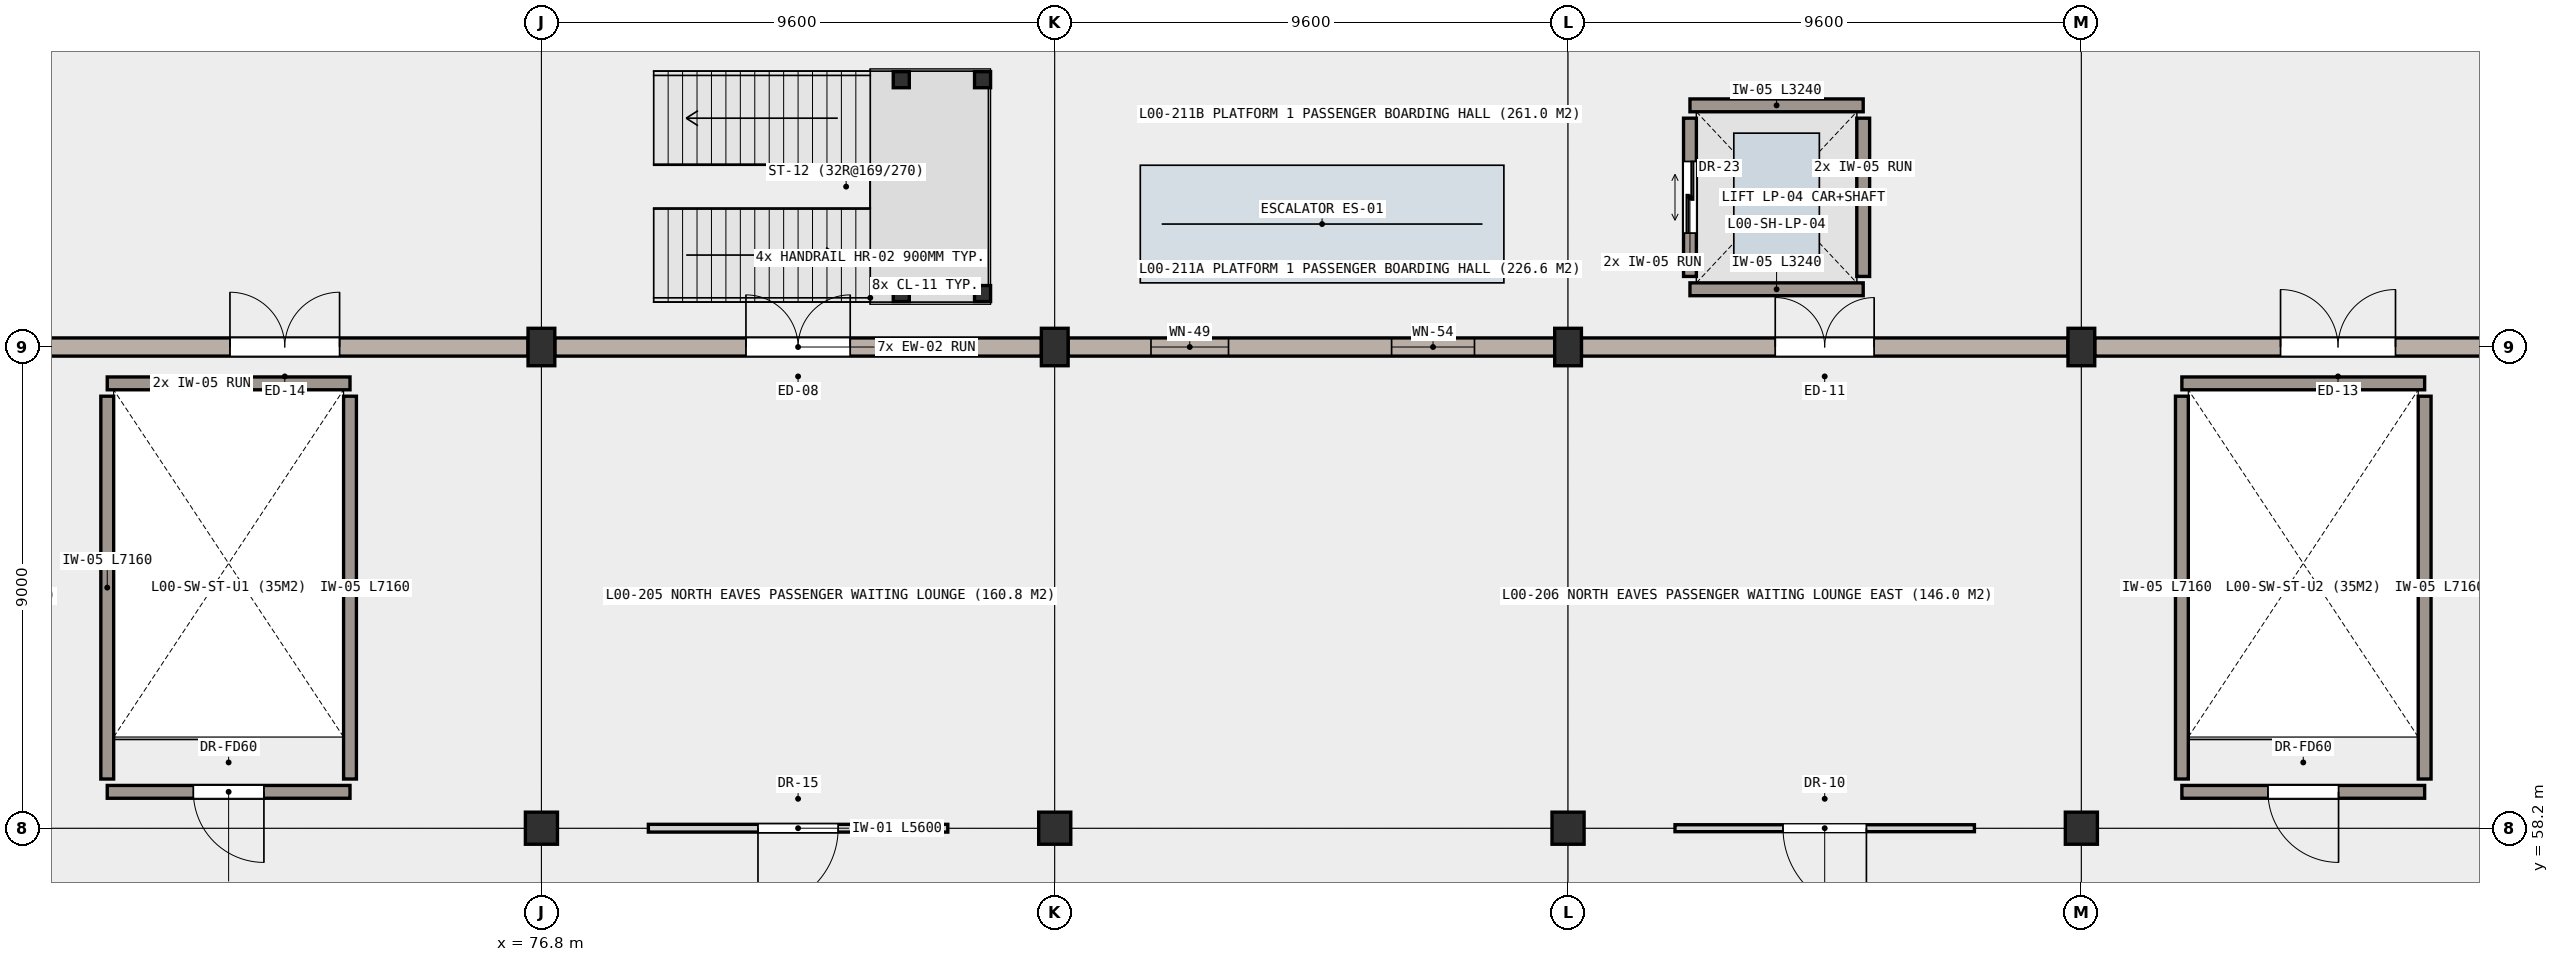
"""IFC4 building model, lengths in metres.
Left out: names, types, materials, properties, quantities, classifications, styles, units other than length and angle.
Written with IfcOpenShell. Run it as: python <this file> out.ifc"""

import sys

from ifc_helpers import new_model, si_unit, direction, frame, frame_2d, origin, origin_2d, place, context, subcontext, project, spatial, rectangle, hollow_rectangle, i_section, extrude, element, fill, save


model = new_model("IFC4")
c1 = context("Model", 3, precision=1e-05, world=origin(), true_north=direction((0.0, 1.0)))
c2 = subcontext(c1, "Body", "Model", "MODEL_VIEW")
j1 = project(units=[si_unit("LENGTHUNIT", "METRE"), si_unit("PLANEANGLEUNIT", "RADIAN")], contexts=[c1])
p1 = place(None, origin())
s1 = spatial("IfcSite", under=j1, at=p1, CompositionType="ELEMENT")
p2 = place(p1, origin())
s2 = spatial("IfcBuilding", under=s1, at=p2, CompositionType="ELEMENT")
p3 = place(p2, origin())
s3 = spatial("IfcBuildingStorey", under=s2, at=p3, CompositionType="ELEMENT", Elevation=0.0)
p4 = place(p3, frame((76.8, 58.2, 0.0), z_axis=(0.0, 0.0, 1.0), x_axis=(1.0, 0.0, 0.0)))
e1 = element("IfcColumn", 1, at=p4, inside=s3, PredefinedType="COLUMN", context=c2, shape_type="SweptSolid", body=[
    extrude(hollow_rectangle(XDim=0.6, YDim=0.6, WallThickness=0.03, at=origin_2d()), origin(), (0.0, 0.0, 1.0), 5.4),
])
p5 = place(p3, frame((76.8, 67.2, 0.0), z_axis=(0.0, 0.0, 1.0), x_axis=(1.0, 0.0, 0.0)))
e2 = element("IfcColumn", 2, at=p5, inside=s3, PredefinedType="COLUMN", context=c2, shape_type="SweptSolid", body=[
    extrude(hollow_rectangle(XDim=0.5, YDim=0.7, WallThickness=0.032, at=origin_2d()), origin(), (0.0, 0.0, 1.0), 5.4),
])
p6 = place(p3, frame((86.4, 58.2, 0.0), z_axis=(0.0, 0.0, 1.0), x_axis=(1.0, 0.0, 0.0)))
e3 = element("IfcColumn", 3, at=p6, inside=s3, PredefinedType="COLUMN", context=c2, shape_type="SweptSolid", body=[
    extrude(hollow_rectangle(XDim=0.6, YDim=0.6, WallThickness=0.03, at=origin_2d()), origin(), (0.0, 0.0, 1.0), 5.4),
])
p7 = place(p3, frame((86.4, 67.2, 0.0), z_axis=(0.0, 0.0, 1.0), x_axis=(1.0, 0.0, 0.0)))
e4 = element("IfcColumn", 4, at=p7, inside=s3, PredefinedType="COLUMN", context=c2, shape_type="SweptSolid", body=[
    extrude(hollow_rectangle(XDim=0.5, YDim=0.7, WallThickness=0.032, at=origin_2d()), origin(), (0.0, 0.0, 1.0), 5.4),
])
p8 = place(p3, frame((96.0, 58.2, 0.0), z_axis=(0.0, 0.0, 1.0), x_axis=(1.0, 0.0, 0.0)))
e5 = element("IfcColumn", 5, at=p8, inside=s3, PredefinedType="COLUMN", context=c2, shape_type="SweptSolid", body=[
    extrude(hollow_rectangle(XDim=0.6, YDim=0.6, WallThickness=0.03, at=origin_2d()), origin(), (0.0, 0.0, 1.0), 5.4),
])
p9 = place(p3, frame((96.0, 67.2, 0.0), z_axis=(0.0, 0.0, 1.0), x_axis=(1.0, 0.0, 0.0)))
e6 = element("IfcColumn", 6, at=p9, inside=s3, PredefinedType="COLUMN", context=c2, shape_type="SweptSolid", body=[
    extrude(hollow_rectangle(XDim=0.5, YDim=0.7, WallThickness=0.032, at=origin_2d()), origin(), (0.0, 0.0, 1.0), 5.4),
])
p10 = place(p3, frame((105.6, 58.2, 0.0), z_axis=(0.0, 0.0, 1.0), x_axis=(1.0, 0.0, 0.0)))
e7 = element("IfcColumn", 7, at=p10, inside=s3, PredefinedType="COLUMN", context=c2, shape_type="SweptSolid", body=[
    extrude(hollow_rectangle(XDim=0.6, YDim=0.6, WallThickness=0.03, at=origin_2d()), origin(), (0.0, 0.0, 1.0), 5.4),
])
p11 = place(p3, frame((105.6, 67.2, 0.0), z_axis=(0.0, 0.0, 1.0), x_axis=(1.0, 0.0, 0.0)))
e8 = element("IfcColumn", 8, at=p11, inside=s3, PredefinedType="COLUMN", context=c2, shape_type="SweptSolid", body=[
    extrude(hollow_rectangle(XDim=0.5, YDim=0.7, WallThickness=0.032, at=origin_2d()), origin(), (0.0, 0.0, 1.0), 5.4),
])
for number, where, z_axis, x_axis in (
    (9, (83.53, 68.2, 0.0), (0.0, 0.0, 1.0), (1.0, 0.0, 0.0)),
    (10, (83.53, 72.2, 0.0), (0.0, 0.0, 1.0), (1.0, 0.0, 0.0)),
    (11, (85.05, 68.2, 0.0), (0.0, 0.0, 1.0), (1.0, 0.0, 0.0)),
    (12, (85.05, 72.2, 0.0), (0.0, 0.0, 1.0), (1.0, 0.0, 0.0)),
):
    element("IfcColumn", number, at=place(p3, frame(where, z_axis=z_axis, x_axis=x_axis)), inside=s3, PredefinedType="COLUMN", context=c2, shape_type="SweptSolid", body=[
        extrude(i_section(OverallWidth=0.3, OverallDepth=0.3, WebThickness=0.011, FlangeThickness=0.019, FilletRadius=0.027, at=origin_2d()), origin(), (0.0, 0.0, 1.0), 2.515),
    ])
p12 = place(p3, frame((67.45, 67.2, 0.0), z_axis=(0.0, 0.0, 1.0), x_axis=(1.0, 0.0, 0.0)))
e13 = element("IfcWall", 13, at=p12, inside=s3, PredefinedType="SOLIDWALL", context=c2, shape_type="SweptSolid", body=[
    extrude(rectangle(XDim=9.1, YDim=0.34, at=frame_2d((4.55, 0.0))), origin(), (0.0, 0.0, 1.0), 4.49),
])
p13 = place(p12, frame((3.525, 0.0, 0.0)))
e14 = element("IfcOpeningElement", 14, at=p13, cuts=e13, PredefinedType="OPENING", context=c2, shape_type="SweptSolid", body=[
    extrude(rectangle(XDim=2.05, YDim=2.45, at=frame_2d((1.025, 1.225))), frame((0.0, 0.18, 0.0), z_axis=(0.0, -1.0, 0.0), x_axis=(1.0, 0.0, 0.0)), (0.0, 0.0, 1.0), 0.36),
])
p14 = place(p3, frame((77.05, 67.2, 0.0), z_axis=(0.0, 0.0, 1.0), x_axis=(1.0, 0.0, 0.0)))
e15 = element("IfcWall", 15, at=p14, inside=s3, PredefinedType="SOLIDWALL", context=c2, shape_type="SweptSolid", body=[
    extrude(rectangle(XDim=9.1, YDim=0.34, at=frame_2d((4.55, 0.0))), origin(), (0.0, 0.0, 1.0), 4.49),
])
p15 = place(p14, frame((3.575, 0.0, 0.0)))
e16 = element("IfcOpeningElement", 16, at=p15, cuts=e15, PredefinedType="OPENING", context=c2, shape_type="SweptSolid", body=[
    extrude(rectangle(XDim=1.95, YDim=2.4, at=frame_2d((0.975, 1.2))), frame((0.0, 0.18, 0.0), z_axis=(0.0, -1.0, 0.0), x_axis=(1.0, 0.0, 0.0)), (0.0, 0.0, 1.0), 0.36),
])
p16 = place(p3, frame((86.65, 67.2, 0.0), z_axis=(0.0, 0.0, 1.0), x_axis=(1.0, 0.0, 0.0)))
e17 = element("IfcWall", 17, at=p16, inside=s3, PredefinedType="SOLIDWALL", context=c2, shape_type="SweptSolid", body=[
    extrude(rectangle(XDim=9.1, YDim=0.34, at=frame_2d((4.55, 0.0))), origin(), (0.0, 0.0, 1.0), 4.49),
])
p17 = place(p16, frame((1.55, 0.0, 0.85)))
e18 = element("IfcOpeningElement", 18, at=p17, cuts=e17, PredefinedType="OPENING", context=c2, shape_type="SweptSolid", body=[
    extrude(rectangle(XDim=1.45, YDim=2.15, at=frame_2d((0.725, 1.075))), frame((0.0, 0.18, 0.0), z_axis=(0.0, -1.0, 0.0), x_axis=(1.0, 0.0, 0.0)), (0.0, 0.0, 1.0), 0.36),
])
p18 = place(p16, frame((6.05, 0.0, 0.85)))
e19 = element("IfcOpeningElement", 19, at=p18, cuts=e17, PredefinedType="OPENING", context=c2, shape_type="SweptSolid", body=[
    extrude(rectangle(XDim=1.55, YDim=1.5, at=frame_2d((0.775, 0.75))), frame((0.0, 0.18, 0.0), z_axis=(0.0, -1.0, 0.0), x_axis=(1.0, 0.0, 0.0)), (0.0, 0.0, 1.0), 0.36),
])
p19 = place(p3, frame((96.25, 67.2, 0.0), z_axis=(0.0, 0.0, 1.0), x_axis=(1.0, 0.0, 0.0)))
e20 = element("IfcWall", 20, at=p19, inside=s3, PredefinedType="SOLIDWALL", context=c2, shape_type="SweptSolid", body=[
    extrude(rectangle(XDim=9.1, YDim=0.34, at=frame_2d((4.55, 0.0))), origin(), (0.0, 0.0, 1.0), 4.49),
])
p20 = place(p19, frame((3.625, 0.0, 0.0)))
e21 = element("IfcOpeningElement", 21, at=p20, cuts=e20, PredefinedType="OPENING", context=c2, shape_type="SweptSolid", body=[
    extrude(rectangle(XDim=1.85, YDim=2.35, at=frame_2d((0.925, 1.175))), frame((0.0, 0.18, 0.0), z_axis=(0.0, -1.0, 0.0), x_axis=(1.0, 0.0, 0.0)), (0.0, 0.0, 1.0), 0.36),
])
p21 = place(p3, frame((105.85, 67.2, 0.0), z_axis=(0.0, 0.0, 1.0), x_axis=(1.0, 0.0, 0.0)))
e22 = element("IfcWall", 22, at=p21, inside=s3, PredefinedType="SOLIDWALL", context=c2, shape_type="SweptSolid", body=[
    extrude(rectangle(XDim=9.1, YDim=0.34, at=frame_2d((4.55, 0.0))), origin(), (0.0, 0.0, 1.0), 4.49),
])
p22 = place(p21, frame((3.475, 0.0, 0.0)))
e23 = element("IfcOpeningElement", 23, at=p22, cuts=e22, PredefinedType="OPENING", context=c2, shape_type="SweptSolid", body=[
    extrude(rectangle(XDim=2.15, YDim=2.5, at=frame_2d((1.075, 1.25))), frame((0.0, 0.18, 0.0), z_axis=(0.0, -1.0, 0.0), x_axis=(1.0, 0.0, 0.0)), (0.0, 0.0, 1.0), 0.36),
])
for number, where, z_axis, x_axis in (
    (24, (101.52, 68.28, 0.0), (0.0, 0.0, 1.0), (-1.0, 0.0, 0.0)),
    (25, (98.28, 71.72, 0.0), (0.0, 0.0, 1.0), (1.0, 0.0, 0.0)),
):
    element("IfcWall", number, at=place(p3, frame(where, z_axis=z_axis, x_axis=x_axis)), inside=s3, PredefinedType="SHEAR", context=c2, shape_type="SweptSolid", body=[
        extrude(rectangle(XDim=3.24, YDim=0.24, at=frame_2d((1.62, 0.0))), origin(), (0.0, 0.0, 1.0), 5.12),
    ])
p23 = place(p3, frame((98.28, 68.52, 0.0), z_axis=(0.0, 0.0, 1.0), x_axis=(0.0, 1.0, 0.0)))
e26 = element("IfcWall", 26, at=p23, inside=s3, PredefinedType="SHEAR", context=c2, shape_type="SweptSolid", body=[
    extrude(rectangle(XDim=2.96, YDim=0.24, at=frame_2d((1.48, 0.0))), origin(), (0.0, 0.0, 1.0), 5.12),
])
p24 = place(p23, frame((0.81, 0.0, 0.0)))
e27 = element("IfcOpeningElement", 27, at=p24, cuts=e26, PredefinedType="OPENING", context=c2, shape_type="SweptSolid", body=[
    extrude(rectangle(XDim=1.34, YDim=2.18, at=frame_2d((0.67, 1.09))), frame((0.0, 0.13, 0.0), z_axis=(0.0, -1.0, 0.0), x_axis=(1.0, 0.0, 0.0)), (0.0, 0.0, 1.0), 0.26),
])
p25 = place(p3, frame((101.52, 71.48, 0.0), z_axis=(0.0, 0.0, 1.0), x_axis=(0.0, -1.0, 0.0)))
e28 = element("IfcWall", 28, at=p25, inside=s3, PredefinedType="SHEAR", context=c2, shape_type="SweptSolid", body=[
    extrude(rectangle(XDim=2.96, YDim=0.24, at=frame_2d((1.48, 0.0))), origin(), (0.0, 0.0, 1.0), 5.12),
])
p26 = place(p3, frame((73.22, 58.88, 0.0), z_axis=(0.0, 0.0, 1.0), x_axis=(-1.0, 0.0, 0.0)))
e29 = element("IfcWall", 29, at=p26, inside=s3, PredefinedType="SHEAR", context=c2, shape_type="SweptSolid", body=[
    extrude(rectangle(XDim=4.54, YDim=0.24, at=frame_2d((2.27, 0.0))), origin(), (0.0, 0.0, 1.0), 5.12),
])
p27 = place(p26, frame((1.61, 0.0, 0.0)))
e30 = element("IfcOpeningElement", 30, at=p27, cuts=e29, PredefinedType="OPENING", context=c2, shape_type="SweptSolid", body=[
    extrude(rectangle(XDim=1.32, YDim=2.15, at=frame_2d((0.66, 1.075))), frame((0.0, 0.13, 0.0), z_axis=(0.0, -1.0, 0.0), x_axis=(1.0, 0.0, 0.0)), (0.0, 0.0, 1.0), 0.26),
])
p28 = place(p3, frame((68.68, 66.52, 0.0), z_axis=(0.0, 0.0, 1.0), x_axis=(1.0, 0.0, 0.0)))
e31 = element("IfcWall", 31, at=p28, inside=s3, PredefinedType="SHEAR", context=c2, shape_type="SweptSolid", body=[
    extrude(rectangle(XDim=4.54, YDim=0.24, at=frame_2d((2.27, 0.0))), origin(), (0.0, 0.0, 1.0), 5.12),
])
for number, where, z_axis, x_axis in (
    (32, (68.68, 59.12, 0.0), (0.0, 0.0, 1.0), (0.0, 1.0, 0.0)),
    (33, (73.22, 66.28, 0.0), (0.0, 0.0, 1.0), (0.0, -1.0, 0.0)),
):
    element("IfcWall", number, at=place(p3, frame(where, z_axis=z_axis, x_axis=x_axis)), inside=s3, PredefinedType="SHEAR", context=c2, shape_type="SweptSolid", body=[
        extrude(rectangle(XDim=7.16, YDim=0.24, at=frame_2d((3.58, 0.0))), origin(), (0.0, 0.0, 1.0), 5.12),
    ])
p29 = place(p3, frame((112.02, 58.88, 0.0), z_axis=(0.0, 0.0, 1.0), x_axis=(-1.0, 0.0, 0.0)))
e34 = element("IfcWall", 34, at=p29, inside=s3, PredefinedType="SHEAR", context=c2, shape_type="SweptSolid", body=[
    extrude(rectangle(XDim=4.54, YDim=0.24, at=frame_2d((2.27, 0.0))), origin(), (0.0, 0.0, 1.0), 5.12),
])
p30 = place(p29, frame((1.61, 0.0, 0.0)))
e35 = element("IfcOpeningElement", 35, at=p30, cuts=e34, PredefinedType="OPENING", context=c2, shape_type="SweptSolid", body=[
    extrude(rectangle(XDim=1.32, YDim=2.15, at=frame_2d((0.66, 1.075))), frame((0.0, 0.13, 0.0), z_axis=(0.0, -1.0, 0.0), x_axis=(1.0, 0.0, 0.0)), (0.0, 0.0, 1.0), 0.26),
])
p31 = place(p3, frame((107.48, 66.52, 0.0), z_axis=(0.0, 0.0, 1.0), x_axis=(1.0, 0.0, 0.0)))
e36 = element("IfcWall", 36, at=p31, inside=s3, PredefinedType="SHEAR", context=c2, shape_type="SweptSolid", body=[
    extrude(rectangle(XDim=4.54, YDim=0.24, at=frame_2d((2.27, 0.0))), origin(), (0.0, 0.0, 1.0), 5.12),
])
for number, where, z_axis, x_axis in (
    (37, (107.48, 59.12, 0.0), (0.0, 0.0, 1.0), (0.0, 1.0, 0.0)),
    (38, (112.02, 66.28, 0.0), (0.0, 0.0, 1.0), (0.0, -1.0, 0.0)),
):
    element("IfcWall", number, at=place(p3, frame(where, z_axis=z_axis, x_axis=x_axis)), inside=s3, PredefinedType="SHEAR", context=c2, shape_type="SweptSolid", body=[
        extrude(rectangle(XDim=7.16, YDim=0.24, at=frame_2d((3.58, 0.0))), origin(), (0.0, 0.0, 1.0), 5.12),
    ])
p32 = place(p3, frame((84.4, 58.2, 0.0), z_axis=(0.0, 0.0, 1.0), x_axis=(-1.0, 0.0, 0.0)))
e39 = element("IfcWall", 39, at=p32, inside=s3, PredefinedType="PARTITIONING", context=c2, shape_type="SweptSolid", body=[
    extrude(rectangle(XDim=5.6, YDim=0.145, at=frame_2d((2.8, 0.0))), origin(), (0.0, 0.0, 1.0), 4.49),
])
p33 = place(p32, frame((2.05, 0.0, 0.0)))
e40 = element("IfcOpeningElement", 40, at=p33, cuts=e39, PredefinedType="OPENING", context=c2, shape_type="SweptSolid", body=[
    extrude(rectangle(XDim=1.5, YDim=2.2, at=frame_2d((0.75, 1.1))), frame((0.0, 0.083, 0.0), z_axis=(0.0, -1.0, 0.0), x_axis=(1.0, 0.0, 0.0)), (0.0, 0.0, 1.0), 0.165),
])
p34 = place(p3, frame((103.6, 58.2, 0.0), z_axis=(0.0, 0.0, 1.0), x_axis=(-1.0, 0.0, 0.0)))
e41 = element("IfcWall", 41, at=p34, inside=s3, PredefinedType="PARTITIONING", context=c2, shape_type="SweptSolid", body=[
    extrude(rectangle(XDim=5.6, YDim=0.13, at=frame_2d((2.8, 0.0))), origin(), (0.0, 0.0, 1.0), 4.49),
])
p35 = place(p34, frame((2.02, 0.0, 0.0)))
e42 = element("IfcOpeningElement", 42, at=p35, cuts=e41, PredefinedType="OPENING", context=c2, shape_type="SweptSolid", body=[
    extrude(rectangle(XDim=1.56, YDim=2.2, at=frame_2d((0.78, 1.1))), frame((0.0, 0.075, 0.0), z_axis=(0.0, -1.0, 0.0), x_axis=(1.0, 0.0, 0.0)), (0.0, 0.0, 1.0), 0.15),
])
p36 = place(p13, origin())
e43 = element("IfcDoor", 43, at=p36, inside=s3, OperationType="DOUBLE_DOOR_SINGLE_SWING", PredefinedType="DOOR", context=c2, shape_type="SweptSolid", body=[
    extrude(rectangle(XDim=2.05, YDim=2.45, at=frame_2d((1.025, 1.225))), frame((0.0, 0.025, 0.0), z_axis=(0.0, -1.0, 0.0), x_axis=(1.0, 0.0, 0.0)), (0.0, 0.0, 1.0), 0.05),
])
fill(e14, e43)
p37 = place(p15, origin())
e44 = element("IfcDoor", 44, at=p37, inside=s3, OperationType="DOUBLE_DOOR_SINGLE_SWING", PredefinedType="DOOR", context=c2, shape_type="SweptSolid", body=[
    extrude(rectangle(XDim=1.95, YDim=2.4, at=frame_2d((0.975, 1.2))), frame((0.0, 0.025, 0.0), z_axis=(0.0, -1.0, 0.0), x_axis=(1.0, 0.0, 0.0)), (0.0, 0.0, 1.0), 0.05),
])
fill(e16, e44)
p38 = place(p17, origin())
e45 = element("IfcWindow", 45, at=p38, inside=s3, PartitioningType="SINGLE_PANEL", PredefinedType="WINDOW", context=c2, shape_type="SweptSolid", body=[
    extrude(rectangle(XDim=1.45, YDim=2.15, at=frame_2d((0.725, 1.075))), frame((0.0, 0.03, 0.0), z_axis=(0.0, -1.0, 0.0), x_axis=(1.0, 0.0, 0.0)), (0.0, 0.0, 1.0), 0.06),
])
fill(e18, e45)
p39 = place(p18, origin())
e46 = element("IfcWindow", 46, at=p39, inside=s3, PartitioningType="SINGLE_PANEL", PredefinedType="WINDOW", context=c2, shape_type="SweptSolid", body=[
    extrude(rectangle(XDim=1.55, YDim=1.5, at=frame_2d((0.775, 0.75))), frame((0.0, 0.03, 0.0), z_axis=(0.0, -1.0, 0.0), x_axis=(1.0, 0.0, 0.0)), (0.0, 0.0, 1.0), 0.06),
])
fill(e19, e46)
p40 = place(p20, origin())
e47 = element("IfcDoor", 47, at=p40, inside=s3, OperationType="DOUBLE_DOOR_SINGLE_SWING", PredefinedType="DOOR", context=c2, shape_type="SweptSolid", body=[
    extrude(rectangle(XDim=1.85, YDim=2.35, at=frame_2d((0.925, 1.175))), frame((0.0, 0.025, 0.0), z_axis=(0.0, -1.0, 0.0), x_axis=(1.0, 0.0, 0.0)), (0.0, 0.0, 1.0), 0.05),
])
fill(e21, e47)
p41 = place(p22, origin())
e48 = element("IfcDoor", 48, at=p41, inside=s3, OperationType="DOUBLE_DOOR_SINGLE_SWING", PredefinedType="DOOR", context=c2, shape_type="SweptSolid", body=[
    extrude(rectangle(XDim=2.15, YDim=2.5, at=frame_2d((1.075, 1.25))), frame((0.0, 0.025, 0.0), z_axis=(0.0, -1.0, 0.0), x_axis=(1.0, 0.0, 0.0)), (0.0, 0.0, 1.0), 0.05),
])
fill(e23, e48)
p42 = place(p24, origin())
e49 = element("IfcDoor", 49, at=p42, inside=s3, OperationType="DOUBLE_DOOR_SLIDING", PredefinedType="DOOR", context=c2, shape_type="SweptSolid", body=[
    extrude(rectangle(XDim=1.34, YDim=2.18, at=frame_2d((0.67, 1.09))), frame((0.0, 0.025, 0.0), z_axis=(0.0, -1.0, 0.0), x_axis=(1.0, 0.0, 0.0)), (0.0, 0.0, 1.0), 0.05),
])
fill(e27, e49)
p43 = place(p27, origin())
e50 = element("IfcDoor", 50, at=p43, inside=s3, OperationType="SINGLE_SWING_LEFT", PredefinedType="DOOR", context=c2, shape_type="SweptSolid", body=[
    extrude(rectangle(XDim=1.32, YDim=2.15, at=frame_2d((0.66, 1.075))), frame((0.0, 0.025, 0.0), z_axis=(0.0, -1.0, 0.0), x_axis=(1.0, 0.0, 0.0)), (0.0, 0.0, 1.0), 0.05),
])
fill(e30, e50)
p44 = place(p30, origin())
e51 = element("IfcDoor", 51, at=p44, inside=s3, OperationType="SINGLE_SWING_LEFT", PredefinedType="DOOR", context=c2, shape_type="SweptSolid", body=[
    extrude(rectangle(XDim=1.32, YDim=2.15, at=frame_2d((0.66, 1.075))), frame((0.0, 0.025, 0.0), z_axis=(0.0, -1.0, 0.0), x_axis=(1.0, 0.0, 0.0)), (0.0, 0.0, 1.0), 0.05),
])
fill(e35, e51)
p45 = place(p33, origin())
e52 = element("IfcDoor", 52, at=p45, inside=s3, OperationType="SINGLE_SWING_RIGHT", PredefinedType="DOOR", context=c2, shape_type="SweptSolid", body=[
    extrude(rectangle(XDim=1.5, YDim=2.2, at=frame_2d((0.75, 1.1))), frame((0.0, 0.025, 0.0), z_axis=(0.0, -1.0, 0.0), x_axis=(1.0, 0.0, 0.0)), (0.0, 0.0, 1.0), 0.05),
])
fill(e40, e52)
p46 = place(p35, origin())
e53 = element("IfcDoor", 53, at=p46, inside=s3, OperationType="SINGLE_SWING_LEFT", PredefinedType="DOOR", context=c2, shape_type="SweptSolid", body=[
    extrude(rectangle(XDim=1.56, YDim=2.2, at=frame_2d((0.78, 1.1))), frame((0.0, 0.025, 0.0), z_axis=(0.0, -1.0, 0.0), x_axis=(1.0, 0.0, 0.0)), (0.0, 0.0, 1.0), 0.05),
])
fill(e42, e53)
save(model, sys.argv[1])
